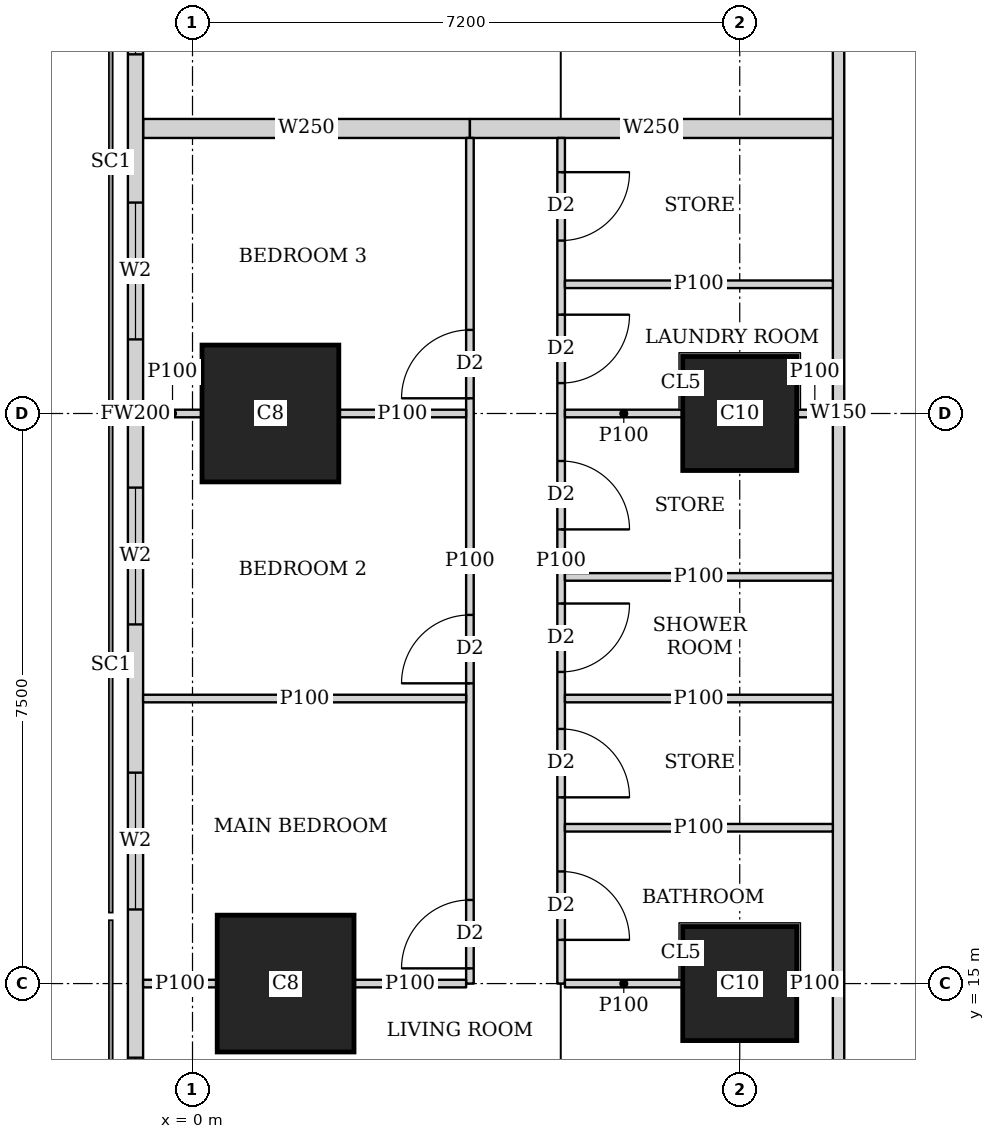
"""IFC4 building model, lengths in metres.
Left out: names, types, materials, properties, quantities, classifications, styles, units other than length and angle.
Written with IfcOpenShell. Run it as: python <this file> out.ifc"""

import sys

from ifc_helpers import new_model, si_unit, direction, frame, frame_2d, origin, origin_2d, place, context, subcontext, project, spatial, rectangle, extrude, element, fill, save


model = new_model("IFC4")
c1 = context("Model", 3, precision=1e-05, world=origin(), true_north=direction((0.0, 1.0)))
c2 = subcontext(c1, "Body", "Model", "MODEL_VIEW")
j1 = project(units=[si_unit("LENGTHUNIT", "METRE"), si_unit("PLANEANGLEUNIT", "RADIAN")], contexts=[c1])
p1 = place(None, origin())
s1 = spatial("IfcSite", under=j1, at=p1, CompositionType="ELEMENT")
p2 = place(p1, origin())
s2 = spatial("IfcBuilding", under=s1, at=p2, CompositionType="ELEMENT")
p3 = place(p2, frame((0.0, 0.0, 135.8)))
s3 = spatial("IfcBuildingStorey", under=s2, at=p3, CompositionType="ELEMENT", Elevation=135.8)
p4 = place(p3, frame((1.225, 15.0, 0.0), z_axis=(0.0, 0.0, 1.0), x_axis=(1.0, 0.0, 0.0)))
e1 = element("IfcColumn", 1, at=p4, inside=s3, PredefinedType="COLUMN", context=c2, shape_type="SweptSolid", body=[
    extrude(rectangle(XDim=1.8, YDim=1.8, at=origin_2d()), origin(), (0.0, 0.0, 1.0), 3.75),
])
p5 = place(p3, frame((7.2, 15.0, 0.0), z_axis=(0.0, 0.0, 1.0), x_axis=(1.0, 0.0, 0.0)))
e2 = element("IfcColumn", 2, at=p5, inside=s3, PredefinedType="COLUMN", context=c2, shape_type="SweptSolid", body=[
    extrude(rectangle(XDim=1.5, YDim=1.5, at=origin_2d()), origin(), (0.0, 0.0, 1.0), 3.75),
])
p6 = place(p3, frame((1.025, 22.5, 0.0), z_axis=(0.0, 0.0, 1.0), x_axis=(1.0, 0.0, 0.0)))
e3 = element("IfcColumn", 3, at=p6, inside=s3, PredefinedType="COLUMN", context=c2, shape_type="SweptSolid", body=[
    extrude(rectangle(XDim=1.8, YDim=1.8, at=origin_2d()), origin(), (0.0, 0.0, 1.0), 3.75),
])
p7 = place(p3, frame((7.2, 22.5, 0.0), z_axis=(0.0, 0.0, 1.0), x_axis=(1.0, 0.0, 0.0)))
e4 = element("IfcColumn", 4, at=p7, inside=s3, PredefinedType="COLUMN", context=c2, shape_type="SweptSolid", body=[
    extrude(rectangle(XDim=1.5, YDim=1.5, at=origin_2d()), origin(), (0.0, 0.0, 1.0), 3.75),
])
p8 = place(p3, frame((-0.75, 42.837, 0.0), z_axis=(0.0, 0.0, 1.0), x_axis=(0.0, -1.0, 0.0)))
e5 = element("IfcWall", 5, at=p8, inside=s3, PredefinedType="SOLIDWALL", context=c2, shape_type="SweptSolid", body=[
    extrude(rectangle(XDim=40.674, YDim=0.2, at=frame_2d((20.337, 0.0))), origin(), (0.0, 0.0, 1.0), 3.5),
])
p9 = place(p8, frame((1.78, 0.0, 0.9)))
e6 = element("IfcOpeningElement", 6, at=p9, cuts=e5, PredefinedType="OPENING", context=c2, shape_type="SweptSolid", body=[
    extrude(rectangle(XDim=1.8, YDim=1.5, at=frame_2d((0.9, 0.75))), frame((0.0, 0.11, 0.0), z_axis=(0.0, -1.0, 0.0), x_axis=(1.0, 0.0, 0.0)), (0.0, 0.0, 1.0), 0.22),
])
p10 = place(p8, frame((6.312, 0.0, 0.9)))
e7 = element("IfcOpeningElement", 7, at=p10, cuts=e5, PredefinedType="OPENING", context=c2, shape_type="SweptSolid", body=[
    extrude(rectangle(XDim=1.8, YDim=1.5, at=frame_2d((0.9, 0.75))), frame((0.0, 0.11, 0.0), z_axis=(0.0, -1.0, 0.0), x_axis=(1.0, 0.0, 0.0)), (0.0, 0.0, 1.0), 0.22),
])
p11 = place(p8, frame((10.062, 0.0, 0.9)))
e8 = element("IfcOpeningElement", 8, at=p11, cuts=e5, PredefinedType="OPENING", context=c2, shape_type="SweptSolid", body=[
    extrude(rectangle(XDim=1.8, YDim=1.5, at=frame_2d((0.9, 0.75))), frame((0.0, 0.11, 0.0), z_axis=(0.0, -1.0, 0.0), x_axis=(1.0, 0.0, 0.0)), (0.0, 0.0, 1.0), 0.22),
])
p12 = place(p8, frame((13.812, 0.0, 0.9)))
e9 = element("IfcOpeningElement", 9, at=p12, cuts=e5, PredefinedType="OPENING", context=c2, shape_type="SweptSolid", body=[
    extrude(rectangle(XDim=1.8, YDim=1.5, at=frame_2d((0.9, 0.75))), frame((0.0, 0.11, 0.0), z_axis=(0.0, -1.0, 0.0), x_axis=(1.0, 0.0, 0.0)), (0.0, 0.0, 1.0), 0.22),
])
p13 = place(p8, frame((17.562, 0.0, 0.9)))
e10 = element("IfcOpeningElement", 10, at=p13, cuts=e5, PredefinedType="OPENING", context=c2, shape_type="SweptSolid", body=[
    extrude(rectangle(XDim=1.8, YDim=1.5, at=frame_2d((0.9, 0.75))), frame((0.0, 0.11, 0.0), z_axis=(0.0, -1.0, 0.0), x_axis=(1.0, 0.0, 0.0)), (0.0, 0.0, 1.0), 0.22),
])
p14 = place(p8, frame((21.312, 0.0, 0.9)))
e11 = element("IfcOpeningElement", 11, at=p14, cuts=e5, PredefinedType="OPENING", context=c2, shape_type="SweptSolid", body=[
    extrude(rectangle(XDim=1.8, YDim=1.5, at=frame_2d((0.9, 0.75))), frame((0.0, 0.11, 0.0), z_axis=(0.0, -1.0, 0.0), x_axis=(1.0, 0.0, 0.0)), (0.0, 0.0, 1.0), 0.22),
])
p15 = place(p8, frame((25.062, 0.0, 0.9)))
e12 = element("IfcOpeningElement", 12, at=p15, cuts=e5, PredefinedType="OPENING", context=c2, shape_type="SweptSolid", body=[
    extrude(rectangle(XDim=1.8, YDim=1.5, at=frame_2d((0.9, 0.75))), frame((0.0, 0.11, 0.0), z_axis=(0.0, -1.0, 0.0), x_axis=(1.0, 0.0, 0.0)), (0.0, 0.0, 1.0), 0.22),
])
p16 = place(p8, frame((28.812, 0.0, 0.9)))
e13 = element("IfcOpeningElement", 13, at=p16, cuts=e5, PredefinedType="OPENING", context=c2, shape_type="SweptSolid", body=[
    extrude(rectangle(XDim=1.8, YDim=1.5, at=frame_2d((0.9, 0.75))), frame((0.0, 0.11, 0.0), z_axis=(0.0, -1.0, 0.0), x_axis=(1.0, 0.0, 0.0)), (0.0, 0.0, 1.0), 0.22),
])
p17 = place(p8, frame((32.562, 0.0, 0.9)))
e14 = element("IfcOpeningElement", 14, at=p17, cuts=e5, PredefinedType="OPENING", context=c2, shape_type="SweptSolid", body=[
    extrude(rectangle(XDim=1.8, YDim=1.5, at=frame_2d((0.9, 0.75))), frame((0.0, 0.11, 0.0), z_axis=(0.0, -1.0, 0.0), x_axis=(1.0, 0.0, 0.0)), (0.0, 0.0, 1.0), 0.22),
])
p18 = place(p8, frame((37.094, 0.0, 0.9)))
e15 = element("IfcOpeningElement", 15, at=p18, cuts=e5, PredefinedType="OPENING", context=c2, shape_type="SweptSolid", body=[
    extrude(rectangle(XDim=1.8, YDim=1.5, at=frame_2d((0.9, 0.75))), frame((0.0, 0.11, 0.0), z_axis=(0.0, -1.0, 0.0), x_axis=(1.0, 0.0, 0.0)), (0.0, 0.0, 1.0), 0.22),
])
p19 = place(p3, frame((8.5, 1.964, 0.0), z_axis=(0.0, 0.0, 1.0), x_axis=(0.0, 1.0, 0.0)))
e16 = element("IfcWall", 16, at=p19, inside=s3, PredefinedType="SOLIDWALL", context=c2, shape_type="SweptSolid", body=[
    extrude(rectangle(XDim=41.097, YDim=0.15, at=frame_2d((20.548, 0.0))), origin(), (0.0, 0.0, 1.0), 3.5),
])
p20 = place(p19, frame((6.911, 0.0, 0.0)))
e17 = element("IfcOpeningElement", 17, at=p20, cuts=e16, PredefinedType="OPENING", context=c2, shape_type="SweptSolid", body=[
    extrude(rectangle(XDim=1.0, YDim=2.1, at=frame_2d((0.5, 1.05))), frame((0.0, 0.085, 0.0), z_axis=(0.0, -1.0, 0.0), x_axis=(1.0, 0.0, 0.0)), (0.0, 0.0, 1.0), 0.17),
])
p21 = place(p19, frame((10.661, 0.0, 0.0)))
e18 = element("IfcOpeningElement", 18, at=p21, cuts=e16, PredefinedType="OPENING", context=c2, shape_type="SweptSolid", body=[
    extrude(rectangle(XDim=1.0, YDim=2.1, at=frame_2d((0.5, 1.05))), frame((0.0, 0.085, 0.0), z_axis=(0.0, -1.0, 0.0), x_axis=(1.0, 0.0, 0.0)), (0.0, 0.0, 1.0), 0.17),
])
p22 = place(p19, frame((25.661, 0.0, 0.0)))
e19 = element("IfcOpeningElement", 19, at=p22, cuts=e16, PredefinedType="OPENING", context=c2, shape_type="SweptSolid", body=[
    extrude(rectangle(XDim=1.0, YDim=2.1, at=frame_2d((0.5, 1.05))), frame((0.0, 0.085, 0.0), z_axis=(0.0, -1.0, 0.0), x_axis=(1.0, 0.0, 0.0)), (0.0, 0.0, 1.0), 0.17),
])
p23 = place(p19, frame((33.161, 0.0, 0.0)))
e20 = element("IfcOpeningElement", 20, at=p23, cuts=e16, PredefinedType="OPENING", context=c2, shape_type="SweptSolid", body=[
    extrude(rectangle(XDim=1.0, YDim=2.1, at=frame_2d((0.5, 1.05))), frame((0.0, 0.085, 0.0), z_axis=(0.0, -1.0, 0.0), x_axis=(1.0, 0.0, 0.0)), (0.0, 0.0, 1.0), 0.17),
])
p24 = place(p3, frame((3.65, 15.0, 0.0), z_axis=(0.0, 0.0, 1.0), x_axis=(0.0, 1.0, 0.0)))
e21 = element("IfcWall", 21, at=p24, inside=s3, PredefinedType="PARTITIONING", context=c2, shape_type="SweptSolid", body=[
    extrude(rectangle(XDim=11.125, YDim=0.1, at=frame_2d((5.562, 0.0))), origin(), (0.0, 0.0, 1.0), 3.5),
])
p25 = place(p24, frame((0.2, 0.0, 0.0)))
e22 = element("IfcOpeningElement", 22, at=p25, cuts=e21, PredefinedType="OPENING", context=c2, shape_type="SweptSolid", body=[
    extrude(rectangle(XDim=0.9, YDim=2.1, at=frame_2d((0.45, 1.05))), frame((0.0, 0.06, 0.0), z_axis=(0.0, -1.0, 0.0), x_axis=(1.0, 0.0, 0.0)), (0.0, 0.0, 1.0), 0.12),
])
p26 = place(p24, frame((3.95, 0.0, 0.0)))
e23 = element("IfcOpeningElement", 23, at=p26, cuts=e21, PredefinedType="OPENING", context=c2, shape_type="SweptSolid", body=[
    extrude(rectangle(XDim=0.9, YDim=2.1, at=frame_2d((0.45, 1.05))), frame((0.0, 0.06, 0.0), z_axis=(0.0, -1.0, 0.0), x_axis=(1.0, 0.0, 0.0)), (0.0, 0.0, 1.0), 0.12),
])
p27 = place(p24, frame((7.7, 0.0, 0.0)))
e24 = element("IfcOpeningElement", 24, at=p27, cuts=e21, PredefinedType="OPENING", context=c2, shape_type="SweptSolid", body=[
    extrude(rectangle(XDim=0.9, YDim=2.1, at=frame_2d((0.45, 1.05))), frame((0.0, 0.06, 0.0), z_axis=(0.0, -1.0, 0.0), x_axis=(1.0, 0.0, 0.0)), (0.0, 0.0, 1.0), 0.12),
])
p28 = place(p3, frame((4.85, 15.0, 0.0), z_axis=(0.0, 0.0, 1.0), x_axis=(0.0, 1.0, 0.0)))
e25 = element("IfcWall", 25, at=p28, inside=s3, PredefinedType="PARTITIONING", context=c2, shape_type="SweptSolid", body=[
    extrude(rectangle(XDim=11.125, YDim=0.1, at=frame_2d((5.562, 0.0))), origin(), (0.0, 0.0, 1.0), 3.5),
])
p29 = place(p28, frame((0.575, 0.0, 0.0)))
e26 = element("IfcOpeningElement", 26, at=p29, cuts=e25, PredefinedType="OPENING", context=c2, shape_type="SweptSolid", body=[
    extrude(rectangle(XDim=0.9, YDim=2.1, at=frame_2d((0.45, 1.05))), frame((0.0, 0.06, 0.0), z_axis=(0.0, -1.0, 0.0), x_axis=(1.0, 0.0, 0.0)), (0.0, 0.0, 1.0), 0.12),
])
p30 = place(p28, frame((4.1, 0.0, 0.0)))
e27 = element("IfcOpeningElement", 27, at=p30, cuts=e25, PredefinedType="OPENING", context=c2, shape_type="SweptSolid", body=[
    extrude(rectangle(XDim=0.9, YDim=2.1, at=frame_2d((0.45, 1.05))), frame((0.0, 0.06, 0.0), z_axis=(0.0, -1.0, 0.0), x_axis=(1.0, 0.0, 0.0)), (0.0, 0.0, 1.0), 0.12),
])
p31 = place(p28, frame((7.9, 0.0, 0.0)))
e28 = element("IfcOpeningElement", 28, at=p31, cuts=e25, PredefinedType="OPENING", context=c2, shape_type="SweptSolid", body=[
    extrude(rectangle(XDim=0.9, YDim=2.1, at=frame_2d((0.45, 1.05))), frame((0.0, 0.06, 0.0), z_axis=(0.0, -1.0, 0.0), x_axis=(1.0, 0.0, 0.0)), (0.0, 0.0, 1.0), 0.12),
])
p32 = place(p28, frame((2.45, 0.0, 0.0)))
e29 = element("IfcOpeningElement", 29, at=p32, cuts=e25, PredefinedType="OPENING", context=c2, shape_type="SweptSolid", body=[
    extrude(rectangle(XDim=0.9, YDim=2.1, at=frame_2d((0.45, 1.05))), frame((0.0, 0.06, 0.0), z_axis=(0.0, -1.0, 0.0), x_axis=(1.0, 0.0, 0.0)), (0.0, 0.0, 1.0), 0.12),
])
p33 = place(p28, frame((5.975, 0.0, 0.0)))
e30 = element("IfcOpeningElement", 30, at=p33, cuts=e25, PredefinedType="OPENING", context=c2, shape_type="SweptSolid", body=[
    extrude(rectangle(XDim=0.9, YDim=2.1, at=frame_2d((0.45, 1.05))), frame((0.0, 0.06, 0.0), z_axis=(0.0, -1.0, 0.0), x_axis=(1.0, 0.0, 0.0)), (0.0, 0.0, 1.0), 0.12),
])
p34 = place(p28, frame((9.775, 0.0, 0.0)))
e31 = element("IfcOpeningElement", 31, at=p34, cuts=e25, PredefinedType="OPENING", context=c2, shape_type="SweptSolid", body=[
    extrude(rectangle(XDim=0.9, YDim=2.1, at=frame_2d((0.45, 1.05))), frame((0.0, 0.06, 0.0), z_axis=(0.0, -1.0, 0.0), x_axis=(1.0, 0.0, 0.0)), (0.0, 0.0, 1.0), 0.12),
])
p35 = place(p3, frame((-0.65, 15.0, 0.0), z_axis=(0.0, 0.0, 1.0), x_axis=(1.0, 0.0, 0.0)))
e32 = element("IfcWall", 32, at=p35, inside=s3, PredefinedType="PARTITIONING", context=c2, shape_type="SweptSolid", body=[
    extrude(rectangle(XDim=0.974, YDim=0.1, at=frame_2d((0.487, 0.0))), origin(), (0.0, 0.0, 1.0), 3.5),
])
p36 = place(p3, frame((2.126, 15.0, 0.0), z_axis=(0.0, 0.0, 1.0), x_axis=(1.0, 0.0, 0.0)))
e33 = element("IfcWall", 33, at=p36, inside=s3, PredefinedType="PARTITIONING", context=c2, shape_type="SweptSolid", body=[
    extrude(rectangle(XDim=1.474, YDim=0.1, at=frame_2d((0.737, 0.0))), origin(), (0.0, 0.0, 1.0), 3.5),
])
p37 = place(p3, frame((-0.65, 18.75, 0.0), z_axis=(0.0, 0.0, 1.0), x_axis=(1.0, 0.0, 0.0)))
e34 = element("IfcWall", 34, at=p37, inside=s3, PredefinedType="PARTITIONING", context=c2, shape_type="SweptSolid", body=[
    extrude(rectangle(XDim=4.25, YDim=0.1, at=frame_2d((2.125, 0.0))), origin(), (0.0, 0.0, 1.0), 2.1),
])
p38 = place(p3, frame((-0.65, 22.5, 0.0), z_axis=(0.0, 0.0, 1.0), x_axis=(1.0, 0.0, 0.0)))
e35 = element("IfcWall", 35, at=p38, inside=s3, PredefinedType="PARTITIONING", context=c2, shape_type="SweptSolid", body=[
    extrude(rectangle(XDim=0.774, YDim=0.1, at=frame_2d((0.387, 0.0))), origin(), (0.0, 0.0, 1.0), 3.5),
])
p39 = place(p3, frame((1.926, 22.5, 0.0), z_axis=(0.0, 0.0, 1.0), x_axis=(1.0, 0.0, 0.0)))
e36 = element("IfcWall", 36, at=p39, inside=s3, PredefinedType="PARTITIONING", context=c2, shape_type="SweptSolid", body=[
    extrude(rectangle(XDim=1.674, YDim=0.1, at=frame_2d((0.837, 0.0))), origin(), (0.0, 0.0, 1.0), 3.5),
])
p40 = place(p3, frame((4.9, 15.0, 0.0), z_axis=(0.0, 0.0, 1.0), x_axis=(1.0, 0.0, 0.0)))
e37 = element("IfcWall", 37, at=p40, inside=s3, PredefinedType="PARTITIONING", context=c2, shape_type="SweptSolid", body=[
    extrude(rectangle(XDim=1.549, YDim=0.1, at=frame_2d((0.774, 0.0))), origin(), (0.0, 0.0, 1.0), 3.5),
])
p41 = place(p3, frame((7.951, 15.0, 0.0), z_axis=(0.0, 0.0, 1.0), x_axis=(1.0, 0.0, 0.0)))
e38 = element("IfcWall", 38, at=p41, inside=s3, PredefinedType="PARTITIONING", context=c2, shape_type="SweptSolid", body=[
    extrude(rectangle(XDim=0.474, YDim=0.1, at=frame_2d((0.237, 0.0))), origin(), (0.0, 0.0, 1.0), 3.5),
])
p42 = place(p3, frame((4.9, 18.75, 0.0), z_axis=(0.0, 0.0, 1.0), x_axis=(1.0, 0.0, 0.0)))
e39 = element("IfcWall", 39, at=p42, inside=s3, PredefinedType="PARTITIONING", context=c2, shape_type="SweptSolid", body=[
    extrude(rectangle(XDim=3.525, YDim=0.1, at=frame_2d((1.763, 0.0))), origin(), (0.0, 0.0, 1.0), 3.5),
])
p43 = place(p3, frame((4.9, 22.5, 0.0), z_axis=(0.0, 0.0, 1.0), x_axis=(1.0, 0.0, 0.0)))
e40 = element("IfcWall", 40, at=p43, inside=s3, PredefinedType="PARTITIONING", context=c2, shape_type="SweptSolid", body=[
    extrude(rectangle(XDim=1.549, YDim=0.1, at=frame_2d((0.774, 0.0))), origin(), (0.0, 0.0, 1.0), 3.5),
])
p44 = place(p3, frame((7.951, 22.5, 0.0), z_axis=(0.0, 0.0, 1.0), x_axis=(1.0, 0.0, 0.0)))
e41 = element("IfcWall", 41, at=p44, inside=s3, PredefinedType="PARTITIONING", context=c2, shape_type="SweptSolid", body=[
    extrude(rectangle(XDim=0.474, YDim=0.1, at=frame_2d((0.237, 0.0))), origin(), (0.0, 0.0, 1.0), 3.5),
])
for number, where, z_axis, x_axis in (
    (42, (4.9, 17.05, 0.0), (0.0, 0.0, 1.0), (1.0, 0.0, 0.0)),
    (43, (4.9, 20.35, 0.0), (0.0, 0.0, 1.0), (1.0, 0.0, 0.0)),
    (44, (4.9, 24.2, 0.0), (0.0, 0.0, 1.0), (1.0, 0.0, 0.0)),
):
    element("IfcWall", number, at=place(p3, frame(where, z_axis=z_axis, x_axis=x_axis)), inside=s3, PredefinedType="PARTITIONING", context=c2, shape_type="SweptSolid", body=[
        extrude(rectangle(XDim=3.525, YDim=0.1, at=frame_2d((1.763, 0.0))), origin(), (0.0, 0.0, 1.0), 3.5),
    ])
p45 = place(p3, frame((-0.65, 26.25, 0.0), z_axis=(0.0, 0.0, 1.0), x_axis=(1.0, 0.0, 0.0)))
e45 = element("IfcWall", 45, at=p45, inside=s3, PredefinedType="SOLIDWALL", context=c2, shape_type="SweptSolid", body=[
    extrude(rectangle(XDim=4.3, YDim=0.25, at=frame_2d((2.15, 0.0))), origin(), (0.0, 0.0, 1.0), 2.1),
])
p46 = place(p3, frame((3.65, 26.25, 0.0), z_axis=(0.0, 0.0, 1.0), x_axis=(1.0, 0.0, 0.0)))
e46 = element("IfcWall", 46, at=p46, inside=s3, PredefinedType="SOLIDWALL", context=c2, shape_type="SweptSolid", body=[
    extrude(rectangle(XDim=4.775, YDim=0.25, at=frame_2d((2.388, 0.0))), origin(), (0.0, 0.0, 1.0), 3.5),
])
p47 = place(p12, origin())
e47 = element("IfcWindow", 47, at=p47, inside=s3, PartitioningType="SINGLE_PANEL", PredefinedType="WINDOW", context=c2, shape_type="SweptSolid", body=[
    extrude(rectangle(XDim=1.8, YDim=1.5, at=frame_2d((0.9, 0.75))), frame((0.0, 0.03, 0.0), z_axis=(0.0, -1.0, 0.0), x_axis=(1.0, 0.0, 0.0)), (0.0, 0.0, 1.0), 0.06),
])
fill(e9, e47)
p48 = place(p13, origin())
e48 = element("IfcWindow", 48, at=p48, inside=s3, PartitioningType="SINGLE_PANEL", PredefinedType="WINDOW", context=c2, shape_type="SweptSolid", body=[
    extrude(rectangle(XDim=1.8, YDim=1.5, at=frame_2d((0.9, 0.75))), frame((0.0, 0.03, 0.0), z_axis=(0.0, -1.0, 0.0), x_axis=(1.0, 0.0, 0.0)), (0.0, 0.0, 1.0), 0.06),
])
fill(e10, e48)
p49 = place(p14, origin())
e49 = element("IfcWindow", 49, at=p49, inside=s3, PartitioningType="SINGLE_PANEL", PredefinedType="WINDOW", context=c2, shape_type="SweptSolid", body=[
    extrude(rectangle(XDim=1.8, YDim=1.5, at=frame_2d((0.9, 0.75))), frame((0.0, 0.03, 0.0), z_axis=(0.0, -1.0, 0.0), x_axis=(1.0, 0.0, 0.0)), (0.0, 0.0, 1.0), 0.06),
])
fill(e11, e49)
p50 = place(p15, origin())
e50 = element("IfcWindow", 50, at=p50, inside=s3, PartitioningType="SINGLE_PANEL", PredefinedType="WINDOW", context=c2, shape_type="SweptSolid", body=[
    extrude(rectangle(XDim=1.8, YDim=1.5, at=frame_2d((0.9, 0.75))), frame((0.0, 0.03, 0.0), z_axis=(0.0, -1.0, 0.0), x_axis=(1.0, 0.0, 0.0)), (0.0, 0.0, 1.0), 0.06),
])
fill(e12, e50)
p51 = place(p16, origin())
e51 = element("IfcWindow", 51, at=p51, inside=s3, PartitioningType="SINGLE_PANEL", PredefinedType="WINDOW", context=c2, shape_type="SweptSolid", body=[
    extrude(rectangle(XDim=1.8, YDim=1.5, at=frame_2d((0.9, 0.75))), frame((0.0, 0.03, 0.0), z_axis=(0.0, -1.0, 0.0), x_axis=(1.0, 0.0, 0.0)), (0.0, 0.0, 1.0), 0.06),
])
fill(e13, e51)
p52 = place(p25, origin())
e52 = element("IfcDoor", 52, at=p52, inside=s3, OperationType="SINGLE_SWING_LEFT", PredefinedType="DOOR", context=c2, shape_type="SweptSolid", body=[
    extrude(rectangle(XDim=0.9, YDim=2.1, at=frame_2d((0.45, 1.05))), frame((0.0, 0.025, 0.0), z_axis=(0.0, -1.0, 0.0), x_axis=(1.0, 0.0, 0.0)), (0.0, 0.0, 1.0), 0.05),
])
fill(e22, e52)
p53 = place(p26, origin())
e53 = element("IfcDoor", 53, at=p53, inside=s3, OperationType="SINGLE_SWING_LEFT", PredefinedType="DOOR", context=c2, shape_type="SweptSolid", body=[
    extrude(rectangle(XDim=0.9, YDim=2.1, at=frame_2d((0.45, 1.05))), frame((0.0, 0.025, 0.0), z_axis=(0.0, -1.0, 0.0), x_axis=(1.0, 0.0, 0.0)), (0.0, 0.0, 1.0), 0.05),
])
fill(e23, e53)
p54 = place(p27, origin())
e54 = element("IfcDoor", 54, at=p54, inside=s3, OperationType="SINGLE_SWING_LEFT", PredefinedType="DOOR", context=c2, shape_type="SweptSolid", body=[
    extrude(rectangle(XDim=0.9, YDim=2.1, at=frame_2d((0.45, 1.05))), frame((0.0, 0.025, 0.0), z_axis=(0.0, -1.0, 0.0), x_axis=(1.0, 0.0, 0.0)), (0.0, 0.0, 1.0), 0.05),
])
fill(e24, e54)
p55 = place(p29, origin())
e55 = element("IfcDoor", 55, at=p55, inside=s3, OperationType="SINGLE_SWING_RIGHT", PredefinedType="DOOR", context=c2, shape_type="SweptSolid", body=[
    extrude(rectangle(XDim=0.9, YDim=2.1, at=frame_2d((0.45, 1.05))), frame((0.0, 0.025, 0.0), z_axis=(0.0, -1.0, 0.0), x_axis=(1.0, 0.0, 0.0)), (0.0, 0.0, 1.0), 0.05),
])
fill(e26, e55)
p56 = place(p30, origin())
e56 = element("IfcDoor", 56, at=p56, inside=s3, OperationType="SINGLE_SWING_LEFT", PredefinedType="DOOR", context=c2, shape_type="SweptSolid", body=[
    extrude(rectangle(XDim=0.9, YDim=2.1, at=frame_2d((0.45, 1.05))), frame((0.0, 0.025, 0.0), z_axis=(0.0, -1.0, 0.0), x_axis=(1.0, 0.0, 0.0)), (0.0, 0.0, 1.0), 0.05),
])
fill(e27, e56)
p57 = place(p31, origin())
e57 = element("IfcDoor", 57, at=p57, inside=s3, OperationType="SINGLE_SWING_LEFT", PredefinedType="DOOR", context=c2, shape_type="SweptSolid", body=[
    extrude(rectangle(XDim=0.9, YDim=2.1, at=frame_2d((0.45, 1.05))), frame((0.0, 0.025, 0.0), z_axis=(0.0, -1.0, 0.0), x_axis=(1.0, 0.0, 0.0)), (0.0, 0.0, 1.0), 0.05),
])
fill(e28, e57)
p58 = place(p32, origin())
e58 = element("IfcDoor", 58, at=p58, inside=s3, OperationType="SINGLE_SWING_RIGHT", PredefinedType="DOOR", context=c2, shape_type="SweptSolid", body=[
    extrude(rectangle(XDim=0.9, YDim=2.1, at=frame_2d((0.45, 1.05))), frame((0.0, 0.025, 0.0), z_axis=(0.0, -1.0, 0.0), x_axis=(1.0, 0.0, 0.0)), (0.0, 0.0, 1.0), 0.05),
])
fill(e29, e58)
p59 = place(p33, origin())
e59 = element("IfcDoor", 59, at=p59, inside=s3, OperationType="SINGLE_SWING_RIGHT", PredefinedType="DOOR", context=c2, shape_type="SweptSolid", body=[
    extrude(rectangle(XDim=0.9, YDim=2.1, at=frame_2d((0.45, 1.05))), frame((0.0, 0.025, 0.0), z_axis=(0.0, -1.0, 0.0), x_axis=(1.0, 0.0, 0.0)), (0.0, 0.0, 1.0), 0.05),
])
fill(e30, e59)
p60 = place(p34, origin())
e60 = element("IfcDoor", 60, at=p60, inside=s3, OperationType="SINGLE_SWING_LEFT", PredefinedType="DOOR", context=c2, shape_type="SweptSolid", body=[
    extrude(rectangle(XDim=0.9, YDim=2.1, at=frame_2d((0.45, 1.05))), frame((0.0, 0.025, 0.0), z_axis=(0.0, -1.0, 0.0), x_axis=(1.0, 0.0, 0.0)), (0.0, 0.0, 1.0), 0.05),
])
fill(e31, e60)
save(model, sys.argv[1])
